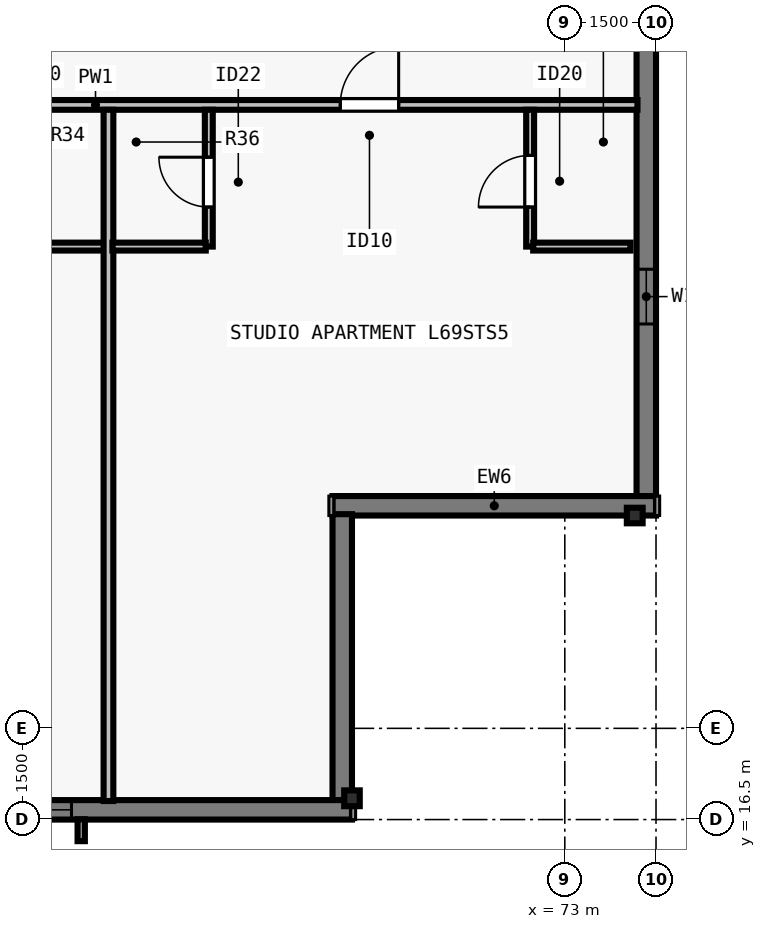
"""IFC4 building model, lengths in metres.
Left out: names, types, materials, properties, quantities, classifications, styles, units other than length and angle.
Written with IfcOpenShell. Run it as: python <this file> out.ifc"""

import sys

from ifc_helpers import new_model, si_unit, direction, frame, frame_2d, origin, origin_2d, place, context, subcontext, project, spatial, rectangle, i_section, extrude, element, fill, save


model = new_model("IFC4")
c1 = context("Model", 3, precision=1e-05, world=origin(), true_north=direction((0.0, 1.0)))
c2 = subcontext(c1, "Body", "Model", "MODEL_VIEW")
j1 = project(units=[si_unit("LENGTHUNIT", "METRE"), si_unit("PLANEANGLEUNIT", "RADIAN")], contexts=[c1])
p1 = place(None, origin())
s1 = spatial("IfcSite", under=j1, at=p1, CompositionType="ELEMENT")
p2 = place(p1, origin())
s2 = spatial("IfcBuilding", under=s1, at=p2, CompositionType="ELEMENT")
p3 = place(p2, frame((0.0, 0.0, 251.5)))
s3 = spatial("IfcBuildingStorey", under=s2, at=p3, CompositionType="ELEMENT", Elevation=251.5)
for number, where, z_axis, x_axis in (
    (1, (69.5, 16.85, 0.0), (0.0, 0.0, 1.0), (1.0, 0.0, 0.0)),
    (2, (74.15, 21.5, 0.0), (0.0, 0.0, 1.0), (0.0, 1.0, 0.0)),
):
    element("IfcColumn", number, at=place(p3, frame(where, z_axis=z_axis, x_axis=x_axis)), inside=s3, PredefinedType="COLUMN", context=c2, shape_type="SweptSolid", body=[
        extrude(i_section(OverallWidth=0.256, OverallDepth=0.26, WebThickness=0.01, FlangeThickness=0.017, FilletRadius=0.013, at=origin_2d()), origin(), (0.0, 0.0, 1.0), 3.5),
    ])
p4 = place(p3, frame((74.34, 56.5, 0.0), z_axis=(0.0, 0.0, 1.0), x_axis=(0.0, -1.0, 0.0)))
e3 = element("IfcWall", 3, at=p4, inside=s3, PredefinedType="SOLIDWALL", context=c2, shape_type="SweptSolid", body=[
    extrude(rectangle(XDim=34.702, YDim=0.32, at=frame_2d((17.351, 0.0))), origin(), (0.0, 0.0, 1.0), 3.29),
])
p5 = place(p4, frame((9.388, 0.0, 0.8)))
e4 = element("IfcOpeningElement", 4, at=p5, cuts=e3, PredefinedType="OPENING", context=c2, shape_type="SweptSolid", body=[
    extrude(rectangle(XDim=1.55, YDim=1.678, at=frame_2d((0.775, 0.839))), frame((0.0, 0.17, 0.0), z_axis=(0.0, -1.0, 0.0), x_axis=(1.0, 0.0, 0.0)), (0.0, 0.0, 1.0), 0.34),
])
p6 = place(p4, frame((14.038, 0.0, 0.8)))
e5 = element("IfcOpeningElement", 5, at=p6, cuts=e3, PredefinedType="OPENING", context=c2, shape_type="SweptSolid", body=[
    extrude(rectangle(XDim=1.55, YDim=1.678, at=frame_2d((0.775, 0.839))), frame((0.0, 0.17, 0.0), z_axis=(0.0, -1.0, 0.0), x_axis=(1.0, 0.0, 0.0)), (0.0, 0.0, 1.0), 0.34),
])
p7 = place(p4, frame((18.114, 0.0, 0.8)))
e6 = element("IfcOpeningElement", 6, at=p7, cuts=e3, PredefinedType="OPENING", context=c2, shape_type="SweptSolid", body=[
    extrude(rectangle(XDim=1.85, YDim=1.678, at=frame_2d((0.925, 0.839))), frame((0.0, 0.17, 0.0), z_axis=(0.0, -1.0, 0.0), x_axis=(1.0, 0.0, 0.0)), (0.0, 0.0, 1.0), 0.34),
])
p8 = place(p4, frame((23.614, 0.0, 0.8)))
e7 = element("IfcOpeningElement", 7, at=p8, cuts=e3, PredefinedType="OPENING", context=c2, shape_type="SweptSolid", body=[
    extrude(rectangle(XDim=1.85, YDim=1.678, at=frame_2d((0.925, 0.839))), frame((0.0, 0.17, 0.0), z_axis=(0.0, -1.0, 0.0), x_axis=(1.0, 0.0, 0.0)), (0.0, 0.0, 1.0), 0.34),
])
p9 = place(p4, frame((30.95, 0.0, 0.8)))
e8 = element("IfcOpeningElement", 8, at=p9, cuts=e3, PredefinedType="OPENING", context=c2, shape_type="SweptSolid", body=[
    extrude(rectangle(XDim=0.9, YDim=1.678, at=frame_2d((0.45, 0.839))), frame((0.0, 0.17, 0.0), z_axis=(0.0, -1.0, 0.0), x_axis=(1.0, 0.0, 0.0)), (0.0, 0.0, 1.0), 0.34),
])
p10 = place(p3, frame((74.5, 21.66, 0.0), z_axis=(0.0, 0.0, 1.0), x_axis=(-1.0, 0.0, 0.0)))
e9 = element("IfcWall", 9, at=p10, inside=s3, PredefinedType="SOLIDWALL", context=c2, shape_type="SweptSolid", body=[
    extrude(rectangle(XDim=5.32, YDim=0.32, at=frame_2d((2.66, 0.0))), origin(), (0.0, 0.0, 1.0), 3.29),
])
p11 = place(p3, frame((69.34, 21.522, 0.0), z_axis=(0.0, 0.0, 1.0), x_axis=(0.0, -1.0, 0.0)))
e10 = element("IfcWall", 10, at=p11, inside=s3, PredefinedType="SOLIDWALL", context=c2, shape_type="SweptSolid", body=[
    extrude(rectangle(XDim=4.724, YDim=0.32, at=frame_2d((2.362, 0.0))), origin(), (0.0, 0.0, 1.0), 3.29),
])
p12 = place(p3, frame((69.5, 16.66, 0.0), z_axis=(0.0, 0.0, 1.0), x_axis=(-1.0, 0.0, 0.0)))
e11 = element("IfcWall", 11, at=p12, inside=s3, PredefinedType="SOLIDWALL", context=c2, shape_type="SweptSolid", body=[
    extrude(rectangle(XDim=34.702, YDim=0.32, at=frame_2d((17.351, 0.0))), origin(), (0.0, 0.0, 1.0), 3.29),
])
p13 = place(p12, frame((4.613, 0.0, 0.8)))
e12 = element("IfcOpeningElement", 12, at=p13, cuts=e11, PredefinedType="OPENING", context=c2, shape_type="SweptSolid", body=[
    extrude(rectangle(XDim=1.85, YDim=1.678, at=frame_2d((0.925, 0.839))), frame((0.0, 0.17, 0.0), z_axis=(0.0, -1.0, 0.0), x_axis=(1.0, 0.0, 0.0)), (0.0, 0.0, 1.0), 0.34),
])
p14 = place(p12, frame((8.138, 0.0, 0.8)))
e13 = element("IfcOpeningElement", 13, at=p14, cuts=e11, PredefinedType="OPENING", context=c2, shape_type="SweptSolid", body=[
    extrude(rectangle(XDim=1.55, YDim=1.678, at=frame_2d((0.775, 0.839))), frame((0.0, 0.17, 0.0), z_axis=(0.0, -1.0, 0.0), x_axis=(1.0, 0.0, 0.0)), (0.0, 0.0, 1.0), 0.34),
])
p15 = place(p12, frame((10.113, 0.0, 0.8)))
e14 = element("IfcOpeningElement", 14, at=p15, cuts=e11, PredefinedType="OPENING", context=c2, shape_type="SweptSolid", body=[
    extrude(rectangle(XDim=1.85, YDim=1.678, at=frame_2d((0.925, 0.839))), frame((0.0, 0.17, 0.0), z_axis=(0.0, -1.0, 0.0), x_axis=(1.0, 0.0, 0.0)), (0.0, 0.0, 1.0), 0.34),
])
p16 = place(p12, frame((14.888, 0.0, 0.8)))
e15 = element("IfcOpeningElement", 15, at=p16, cuts=e11, PredefinedType="OPENING", context=c2, shape_type="SweptSolid", body=[
    extrude(rectangle(XDim=1.55, YDim=1.678, at=frame_2d((0.775, 0.839))), frame((0.0, 0.17, 0.0), z_axis=(0.0, -1.0, 0.0), x_axis=(1.0, 0.0, 0.0)), (0.0, 0.0, 1.0), 0.34),
])
p17 = place(p12, frame((18.114, 0.0, 0.8)))
e16 = element("IfcOpeningElement", 16, at=p17, cuts=e11, PredefinedType="OPENING", context=c2, shape_type="SweptSolid", body=[
    extrude(rectangle(XDim=1.85, YDim=1.678, at=frame_2d((0.925, 0.839))), frame((0.0, 0.17, 0.0), z_axis=(0.0, -1.0, 0.0), x_axis=(1.0, 0.0, 0.0)), (0.0, 0.0, 1.0), 0.34),
])
p18 = place(p12, frame((24.864, 0.0, 0.8)))
e17 = element("IfcOpeningElement", 17, at=p18, cuts=e11, PredefinedType="OPENING", context=c2, shape_type="SweptSolid", body=[
    extrude(rectangle(XDim=1.85, YDim=1.678, at=frame_2d((0.925, 0.839))), frame((0.0, 0.17, 0.0), z_axis=(0.0, -1.0, 0.0), x_axis=(1.0, 0.0, 0.0)), (0.0, 0.0, 1.0), 0.34),
])
p19 = place(p12, frame((28.389, 0.0, 0.8)))
e18 = element("IfcOpeningElement", 18, at=p19, cuts=e11, PredefinedType="OPENING", context=c2, shape_type="SweptSolid", body=[
    extrude(rectangle(XDim=1.55, YDim=1.678, at=frame_2d((0.775, 0.839))), frame((0.0, 0.17, 0.0), z_axis=(0.0, -1.0, 0.0), x_axis=(1.0, 0.0, 0.0)), (0.0, 0.0, 1.0), 0.34),
])
p20 = place(p3, frame((29.915, 28.252, 0.0), z_axis=(0.0, 0.0, 1.0), x_axis=(1.0, 0.0, 0.0)))
e19 = element("IfcWall", 19, at=p20, inside=s3, PredefinedType="PARTITIONING", context=c2, shape_type="SweptSolid", body=[
    extrude(rectangle(XDim=44.28, YDim=0.16, at=frame_2d((22.14, 0.0))), origin(), (0.0, 0.0, 1.0), 2.958),
])
p21 = place(p20, frame((5.002, 0.0, 0.0)))
e20 = element("IfcOpeningElement", 20, at=p21, cuts=e19, PredefinedType="OPENING", context=c2, shape_type="SweptSolid", body=[
    extrude(rectangle(XDim=0.96, YDim=2.18, at=frame_2d((0.48, 1.09))), frame((0.0, 0.09, 0.0), z_axis=(0.0, -1.0, 0.0), x_axis=(1.0, 0.0, 0.0)), (0.0, 0.0, 1.0), 0.18),
])
p22 = place(p20, frame((12.718, 0.0, 0.0)))
e21 = element("IfcOpeningElement", 21, at=p22, cuts=e19, PredefinedType="OPENING", context=c2, shape_type="SweptSolid", body=[
    extrude(rectangle(XDim=0.96, YDim=2.18, at=frame_2d((0.48, 1.09))), frame((0.0, 0.09, 0.0), z_axis=(0.0, -1.0, 0.0), x_axis=(1.0, 0.0, 0.0)), (0.0, 0.0, 1.0), 0.18),
])
p23 = place(p20, frame((21.55, 0.0, 0.0)))
e22 = element("IfcOpeningElement", 22, at=p23, cuts=e19, PredefinedType="OPENING", context=c2, shape_type="SweptSolid", body=[
    extrude(rectangle(XDim=0.96, YDim=2.18, at=frame_2d((0.48, 1.09))), frame((0.0, 0.09, 0.0), z_axis=(0.0, -1.0, 0.0), x_axis=(1.0, 0.0, 0.0)), (0.0, 0.0, 1.0), 0.18),
])
p24 = place(p20, frame((30.382, 0.0, 0.0)))
e23 = element("IfcOpeningElement", 23, at=p24, cuts=e19, PredefinedType="OPENING", context=c2, shape_type="SweptSolid", body=[
    extrude(rectangle(XDim=0.96, YDim=2.18, at=frame_2d((0.48, 1.09))), frame((0.0, 0.09, 0.0), z_axis=(0.0, -1.0, 0.0), x_axis=(1.0, 0.0, 0.0)), (0.0, 0.0, 1.0), 0.18),
])
p25 = place(p20, frame((39.393, 0.0, 0.0)))
e24 = element("IfcOpeningElement", 24, at=p25, cuts=e19, PredefinedType="OPENING", context=c2, shape_type="SweptSolid", body=[
    extrude(rectangle(XDim=0.96, YDim=2.18, at=frame_2d((0.48, 1.09))), frame((0.0, 0.09, 0.0), z_axis=(0.0, -1.0, 0.0), x_axis=(1.0, 0.0, 0.0)), (0.0, 0.0, 1.0), 0.18),
])
p26 = place(p3, frame((63.896, 25.923, 0.0), z_axis=(0.0, 0.0, 1.0), x_axis=(1.0, 0.0, 0.0)))
e25 = element("IfcWall", 25, at=p26, inside=s3, PredefinedType="PLUMBINGWALL", context=c2, shape_type="SweptSolid", body=[
    extrude(rectangle(XDim=1.6, YDim=0.13, at=frame_2d((0.8, 0.0))), origin(), (0.0, 0.0, 1.0), 3.29),
])
p27 = place(p3, frame((65.496, 16.805, 0.0), z_axis=(0.0, 0.0, 1.0), x_axis=(0.0, 1.0, 0.0)))
e26 = element("IfcWall", 26, at=p27, inside=s3, PredefinedType="PARTITIONING", context=c2, shape_type="SweptSolid", body=[
    extrude(rectangle(XDim=11.368, YDim=0.16, at=frame_2d((5.684, 0.0))), origin(), (0.0, 0.0, 1.0), 2.573),
])
p28 = place(p3, frame((67.146, 25.923, 0.0), z_axis=(0.0, 0.0, 1.0), x_axis=(0.0, 1.0, 0.0)))
e27 = element("IfcWall", 27, at=p28, inside=s3, PredefinedType="PLUMBINGWALL", context=c2, shape_type="SweptSolid", body=[
    extrude(rectangle(XDim=2.25, YDim=0.13, at=frame_2d((1.125, 0.0))), origin(), (0.0, 0.0, 1.0), 3.29),
])
p29 = place(p28, frame((0.65, 0.0, 0.0)))
e28 = element("IfcOpeningElement", 28, at=p29, cuts=e27, PredefinedType="OPENING", context=c2, shape_type="SweptSolid", body=[
    extrude(rectangle(XDim=0.82, YDim=2.1, at=frame_2d((0.41, 1.05))), frame((0.0, 0.075, 0.0), z_axis=(0.0, -1.0, 0.0), x_axis=(1.0, 0.0, 0.0)), (0.0, 0.0, 1.0), 0.15),
])
p30 = place(p3, frame((65.561, 25.923, 0.0), z_axis=(0.0, 0.0, 1.0), x_axis=(1.0, 0.0, 0.0)))
e29 = element("IfcWall", 29, at=p30, inside=s3, PredefinedType="PLUMBINGWALL", context=c2, shape_type="SweptSolid", body=[
    extrude(rectangle(XDim=1.535, YDim=0.13, at=frame_2d((0.768, 0.0))), origin(), (0.0, 0.0, 1.0), 3.29),
])
p31 = place(p3, frame((72.43, 25.923, 0.0), z_axis=(0.0, 0.0, 1.0), x_axis=(0.0, 1.0, 0.0)))
e30 = element("IfcWall", 30, at=p31, inside=s3, PredefinedType="PLUMBINGWALL", context=c2, shape_type="SweptSolid", body=[
    extrude(rectangle(XDim=2.25, YDim=0.13, at=frame_2d((1.125, 0.0))), origin(), (0.0, 0.0, 1.0), 3.29),
])
p32 = place(p31, frame((0.65, 0.0, 0.0)))
e31 = element("IfcOpeningElement", 31, at=p32, cuts=e30, PredefinedType="OPENING", context=c2, shape_type="SweptSolid", body=[
    extrude(rectangle(XDim=0.85, YDim=2.1, at=frame_2d((0.425, 1.05))), frame((0.0, 0.075, 0.0), z_axis=(0.0, -1.0, 0.0), x_axis=(1.0, 0.0, 0.0)), (0.0, 0.0, 1.0), 0.15),
])
p33 = place(p3, frame((72.48, 25.923, 0.0), z_axis=(0.0, 0.0, 1.0), x_axis=(1.0, 0.0, 0.0)))
e32 = element("IfcWall", 32, at=p33, inside=s3, PredefinedType="PLUMBINGWALL", context=c2, shape_type="SweptSolid", body=[
    extrude(rectangle(XDim=1.6, YDim=0.13, at=frame_2d((0.8, 0.0))), origin(), (0.0, 0.0, 1.0), 3.29),
])
p34 = place(p13, origin())
e33 = element("IfcWindow", 33, at=p34, inside=s3, PartitioningType="SINGLE_PANEL", PredefinedType="WINDOW", context=c2, shape_type="SweptSolid", body=[
    extrude(rectangle(XDim=1.85, YDim=1.678, at=frame_2d((0.925, 0.839))), frame((0.0, -0.05, 0.0), z_axis=(0.0, -1.0, 0.0), x_axis=(1.0, 0.0, 0.0)), (0.0, 0.0, 1.0), 0.06),
])
fill(e12, e33)
p35 = place(p9, origin())
e34 = element("IfcWindow", 34, at=p35, inside=s3, PartitioningType="SINGLE_PANEL", PredefinedType="WINDOW", context=c2, shape_type="SweptSolid", body=[
    extrude(rectangle(XDim=0.9, YDim=1.678, at=frame_2d((0.45, 0.839))), frame((0.0, -0.04, 0.0), z_axis=(0.0, -1.0, 0.0), x_axis=(1.0, 0.0, 0.0)), (0.0, 0.0, 1.0), 0.06),
])
fill(e8, e34)
p36 = place(p29, origin())
e35 = element("IfcDoor", 35, at=p36, inside=s3, OperationType="SINGLE_SWING_RIGHT", PredefinedType="DOOR", context=c2, shape_type="SweptSolid", body=[
    extrude(rectangle(XDim=0.82, YDim=2.1, at=frame_2d((0.41, 1.05))), frame((0.0, 0.025, 0.0), z_axis=(0.0, -1.0, 0.0), x_axis=(1.0, 0.0, 0.0)), (0.0, 0.0, 1.0), 0.05),
])
fill(e28, e35)
p37 = place(p32, origin())
e36 = element("IfcDoor", 36, at=p37, inside=s3, OperationType="SINGLE_SWING_LEFT", PredefinedType="DOOR", context=c2, shape_type="SweptSolid", body=[
    extrude(rectangle(XDim=0.85, YDim=2.1, at=frame_2d((0.425, 1.05))), frame((0.0, 0.025, 0.0), z_axis=(0.0, -1.0, 0.0), x_axis=(1.0, 0.0, 0.0)), (0.0, 0.0, 1.0), 0.05),
])
fill(e31, e36)
p38 = place(p25, origin())
e37 = element("IfcDoor", 37, at=p38, inside=s3, OperationType="SINGLE_SWING_RIGHT", PredefinedType="DOOR", context=c2, shape_type="SweptSolid", body=[
    extrude(rectangle(XDim=0.96, YDim=2.18, at=frame_2d((0.48, 1.09))), frame((0.0, 0.025, 0.0), z_axis=(0.0, -1.0, 0.0), x_axis=(1.0, 0.0, 0.0)), (0.0, 0.0, 1.0), 0.05),
])
fill(e24, e37)
save(model, sys.argv[1])
